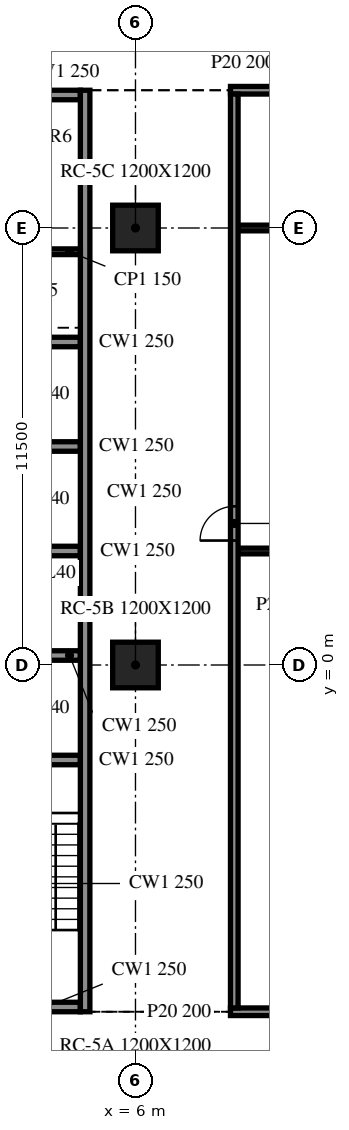
"""IFC4 building model, lengths in metres.
Left out: names, types, materials, properties, quantities, classifications, styles, units other than length and angle.
Written with IfcOpenShell. Run it as: python <this file> out.ifc"""

import sys

from ifc_helpers import new_model, si_unit, direction, frame, frame_2d, origin, origin_2d, place, context, subcontext, project, spatial, rectangle, extrude, element, fill, save


model = new_model("IFC4")
c1 = context("Model", 3, precision=1e-05, world=origin(), true_north=direction((0.0, 1.0)))
c2 = subcontext(c1, "Body", "Model", "MODEL_VIEW")
j1 = project(units=[si_unit("LENGTHUNIT", "METRE"), si_unit("PLANEANGLEUNIT", "RADIAN")], contexts=[c1])
p1 = place(None, origin())
s1 = spatial("IfcSite", under=j1, at=p1, CompositionType="ELEMENT")
p2 = place(p1, origin())
s2 = spatial("IfcBuilding", under=s1, at=p2, CompositionType="ELEMENT")
p3 = place(p2, frame((0.0, 0.0, 170.6)))
s3 = spatial("IfcBuildingStorey", under=s2, at=p3, CompositionType="ELEMENT", Elevation=170.6)
for number, where, z_axis, x_axis in (
    (1, (6.0, 0.0, -0.34), (0.0, 0.0, 1.0), (1.0, 0.0, 0.0)),
    (2, (6.0, 11.5, -0.34), (0.0, 0.0, 1.0), (1.0, 0.0, 0.0)),
):
    element("IfcColumn", number, at=place(p3, frame(where, z_axis=z_axis, x_axis=x_axis)), inside=s3, PredefinedType="COLUMN", context=c2, shape_type="SweptSolid", body=[
        extrude(rectangle(XDim=1.2, YDim=1.2, at=origin_2d()), origin(), (0.0, 0.0, 1.0), 3.8),
    ])
p4 = place(p3, frame((4.675, -9.125, 0.0), z_axis=(0.0, 0.0, 1.0), x_axis=(0.0, 1.0, 0.0)))
e3 = element("IfcWall", 3, at=p4, inside=s3, PredefinedType="SOLIDWALL", context=c2, shape_type="SweptSolid", body=[
    extrude(rectangle(XDim=24.25, YDim=0.25, at=frame_2d((12.125, 0.0))), origin(), (0.0, 0.0, 1.0), 3.46),
])
p5 = place(p3, frame((4.55, -9.0, 0.0), z_axis=(0.0, 0.0, 1.0), x_axis=(-1.0, 0.0, 0.0)))
e4 = element("IfcWall", 4, at=p5, inside=s3, PredefinedType="SOLIDWALL", context=c2, shape_type="SweptSolid", body=[
    extrude(rectangle(XDim=9.1, YDim=0.25, at=frame_2d((4.55, 0.0))), origin(), (0.0, 0.0, 1.0), 3.46),
])
p6 = place(p5, frame((3.65, 0.0, 0.0)))
e5 = element("IfcOpeningElement", 5, at=p6, cuts=e4, PredefinedType="OPENING", context=c2, shape_type="SweptSolid", body=[
    extrude(rectangle(XDim=1.8, YDim=2.1, at=frame_2d((0.9, 1.05))), frame((0.0, 0.135, 0.0), z_axis=(0.0, -1.0, 0.0), x_axis=(1.0, 0.0, 0.0)), (0.0, 0.0, 1.0), 0.27),
])
p7 = place(p3, frame((-4.55, 15.0, 0.0), z_axis=(0.0, 0.0, 1.0), x_axis=(1.0, 0.0, 0.0)))
e6 = element("IfcWall", 6, at=p7, inside=s3, PredefinedType="SOLIDWALL", context=c2, shape_type="SweptSolid", body=[
    extrude(rectangle(XDim=9.1, YDim=0.25, at=frame_2d((4.55, 0.0))), origin(), (0.0, 0.0, 1.0), 3.46),
])
p8 = place(p7, frame((3.65, 0.0, 0.0)))
e7 = element("IfcOpeningElement", 7, at=p8, cuts=e6, PredefinedType="OPENING", context=c2, shape_type="SweptSolid", body=[
    extrude(rectangle(XDim=1.8, YDim=2.1, at=frame_2d((0.9, 1.05))), frame((0.0, 0.135, 0.0), z_axis=(0.0, -1.0, 0.0), x_axis=(1.0, 0.0, 0.0)), (0.0, 0.0, 1.0), 0.27),
])
for number, where, z_axis, x_axis in (
    (8, (1.7, -2.5, 0.0), (0.0, 0.0, 1.0), (1.0, 0.0, 0.0)),
    (9, (1.7, 0.25, 0.0), (0.0, 0.0, 1.0), (1.0, 0.0, 0.0)),
    (10, (1.7, 3.0, 0.0), (0.0, 0.0, 1.0), (1.0, 0.0, 0.0)),
    (11, (1.7, 5.75, 0.0), (0.0, 0.0, 1.0), (1.0, 0.0, 0.0)),
    (12, (1.7, 8.5, 0.0), (0.0, 0.0, 1.0), (1.0, 0.0, 0.0)),
):
    element("IfcWall", number, at=place(p3, frame(where, z_axis=z_axis, x_axis=x_axis)), inside=s3, PredefinedType="SOLIDWALL", context=c2, shape_type="SweptSolid", body=[
        extrude(rectangle(XDim=2.85, YDim=0.25, at=frame_2d((1.425, 0.0))), origin(), (0.0, 0.0, 1.0), 3.46),
    ])
p9 = place(p3, frame((1.7, 10.875, 0.0), z_axis=(0.0, 0.0, 1.0), x_axis=(1.0, 0.0, 0.0)))
e13 = element("IfcWall", 13, at=p9, inside=s3, PredefinedType="PARTITIONING", context=c2, shape_type="SweptSolid", body=[
    extrude(rectangle(XDim=2.85, YDim=0.15, at=frame_2d((1.425, 0.0))), origin(), (0.0, 0.0, 1.0), 3.46),
])
p10 = place(p3, frame((8.5, -9.125, 0.0), z_axis=(0.0, 0.0, 1.0), x_axis=(1.0, 0.0, 0.0)))
e14 = element("IfcWall", 14, at=p10, inside=s3, PredefinedType="PARTITIONING", context=c2, shape_type="SweptSolid", body=[
    extrude(rectangle(XDim=6.9, YDim=0.2, at=frame_2d((3.45, 0.0))), origin(), (0.0, 0.0, 1.0), 3.46),
])
p11 = place(p10, frame((2.9, 0.0, 0.0)))
e15 = element("IfcOpeningElement", 15, at=p11, cuts=e14, PredefinedType="OPENING", context=c2, shape_type="SweptSolid", body=[
    extrude(rectangle(XDim=0.9, YDim=2.1, at=frame_2d((0.45, 1.05))), frame((0.0, 0.11, 0.0), z_axis=(0.0, -1.0, 0.0), x_axis=(1.0, 0.0, 0.0)), (0.0, 0.0, 1.0), 0.22),
])
for number, where, z_axis, x_axis in (
    (16, (8.7, 3.0, 0.0), (0.0, 0.0, 1.0), (1.0, 0.0, 0.0)),
    (17, (8.7, 11.5, 0.0), (0.0, 0.0, 1.0), (1.0, 0.0, 0.0)),
):
    element("IfcWall", number, at=place(p3, frame(where, z_axis=z_axis, x_axis=x_axis)), inside=s3, PredefinedType="PARTITIONING", context=c2, shape_type="SweptSolid", body=[
        extrude(rectangle(XDim=6.5, YDim=0.15, at=frame_2d((3.25, 0.0))), origin(), (0.0, 0.0, 1.0), 3.46),
    ])
p12 = place(p3, frame((8.5, 15.125, 0.0), z_axis=(0.0, 0.0, 1.0), x_axis=(1.0, 0.0, 0.0)))
e18 = element("IfcWall", 18, at=p12, inside=s3, PredefinedType="PARTITIONING", context=c2, shape_type="SweptSolid", body=[
    extrude(rectangle(XDim=6.9, YDim=0.2, at=frame_2d((3.45, 0.0))), origin(), (0.0, 0.0, 1.0), 3.46),
])
p13 = place(p12, frame((2.9, 0.0, 0.0)))
e19 = element("IfcOpeningElement", 19, at=p13, cuts=e18, PredefinedType="OPENING", context=c2, shape_type="SweptSolid", body=[
    extrude(rectangle(XDim=0.9, YDim=2.1, at=frame_2d((0.45, 1.05))), frame((0.0, 0.11, 0.0), z_axis=(0.0, -1.0, 0.0), x_axis=(1.0, 0.0, 0.0)), (0.0, 0.0, 1.0), 0.22),
])
p14 = place(p3, frame((8.6, -9.025, 0.0), z_axis=(0.0, 0.0, 1.0), x_axis=(0.0, 1.0, 0.0)))
e20 = element("IfcWall", 20, at=p14, inside=s3, PredefinedType="PARTITIONING", context=c2, shape_type="SweptSolid", body=[
    extrude(rectangle(XDim=24.05, YDim=0.2, at=frame_2d((12.025, 0.0))), origin(), (0.0, 0.0, 1.0), 3.46),
])
p15 = place(p14, frame((12.3, 0.0, 0.0)))
e21 = element("IfcOpeningElement", 21, at=p15, cuts=e20, PredefinedType="OPENING", context=c2, shape_type="SweptSolid", body=[
    extrude(rectangle(XDim=0.9, YDim=2.1, at=frame_2d((0.45, 1.05))), frame((0.0, 0.11, 0.0), z_axis=(0.0, -1.0, 0.0), x_axis=(1.0, 0.0, 0.0)), (0.0, 0.0, 1.0), 0.22),
])
p16 = place(p15, origin())
e22 = element("IfcDoor", 22, at=p16, inside=s3, OperationType="SINGLE_SWING_LEFT", PredefinedType="DOOR", context=c2, shape_type="SweptSolid", body=[
    extrude(rectangle(XDim=0.9, YDim=2.1, at=frame_2d((0.45, 1.05))), frame((0.0, 0.025, 0.0), z_axis=(0.0, -1.0, 0.0), x_axis=(1.0, 0.0, 0.0)), (0.0, 0.0, 1.0), 0.05),
])
fill(e21, e22)
save(model, sys.argv[1])
